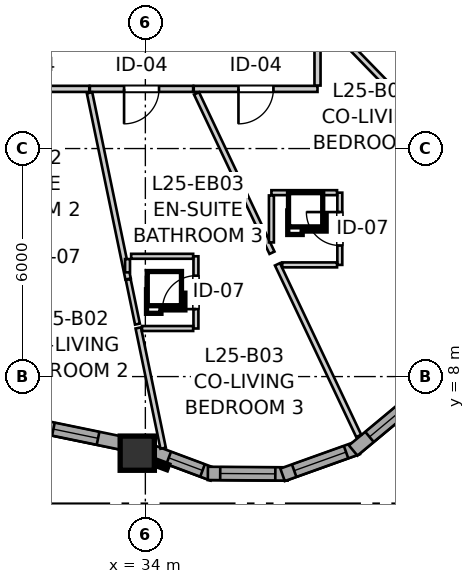
"""IFC4 building model, lengths in metres.
Left out: names, types, materials, properties, quantities, classifications, styles, units other than length and angle.
Written with IfcOpenShell. Run it as: python <this file> out.ifc"""

import sys

from ifc_helpers import new_model, si_unit, direction, frame, frame_2d, origin, origin_2d, place, context, subcontext, project, spatial, rectangle, extrude, source, transform, mapped, element, fill, save


model = new_model("IFC4")
c1 = context("Model", 3, precision=1e-05, world=origin(), true_north=direction((0.0, 1.0)))
c2 = subcontext(c1, "Body", "Model", "MODEL_VIEW")
j1 = project(units=[si_unit("LENGTHUNIT", "METRE"), si_unit("PLANEANGLEUNIT", "RADIAN")], contexts=[c1])
p1 = place(None, origin())
s1 = spatial("IfcSite", under=j1, at=p1, CompositionType="ELEMENT")
p2 = place(p1, origin())
s2 = spatial("IfcBuilding", under=s1, at=p2, CompositionType="ELEMENT")
p3 = place(p2, frame((0.0, 0.0, 86.4)))
s3 = spatial("IfcBuildingStorey", under=s2, at=p3, CompositionType="ELEMENT", Elevation=86.4)
m1 = source(origin(), c2, "Body", "SweptSolid", [
    extrude(rectangle(XDim=0.9, YDim=0.9, at=origin_2d()), origin(), (0.0, 0.0, 1.0), 2.95),
])
p4 = place(p3, frame((33.787, 5.985, 0.0), z_axis=(0.0, 0.0, 1.0), x_axis=(1.0, 0.0, 0.0)))
e1 = element("IfcColumn", 1, at=p4, inside=s3, PredefinedType="COLUMN", context=c2, shape_type="MappedRepresentation", body=[
    mapped(m1, transform((0.0, 0.0, 0.0), x_axis=(1.0, 0.0, 0.0), y_axis=(0.0, 1.0, 0.0), z_axis=(0.0, 0.0, 1.0), scale=1.0)),
])
p5 = place(p3, frame((30.724, 6.794, 0.0), z_axis=(0.0, 0.0, 1.0), x_axis=(0.979439663571, -0.201737317878, 0.0)))
e2 = element("IfcWall", 2, at=p5, inside=s3, PredefinedType="SOLIDWALL", context=c2, shape_type="SweptSolid", body=[
    extrude(rectangle(XDim=2.938, YDim=0.35, at=frame_2d((1.469, 0.0))), origin(), (0.0, 0.0, 1.0), 2.48),
])
p6 = place(p5, frame((0.874, 0.0, 0.82)))
e3 = element("IfcOpeningElement", 3, at=p6, cuts=e2, PredefinedType="OPENING", context=c2, shape_type="SweptSolid", body=[
    extrude(rectangle(XDim=1.2, YDim=1.45, at=frame_2d((0.6, 0.725))), frame((0.0, 0.185, 0.0), z_axis=(0.0, -1.0, 0.0), x_axis=(1.0, 0.0, 0.0)), (0.0, 0.0, 1.0), 0.37),
])
p7 = place(p3, frame((34.059, 6.07, 0.0), z_axis=(0.0, 0.0, 1.0), x_axis=(0.936803747811, -0.349855310219, 0.0)))
e4 = element("IfcWall", 4, at=p7, inside=s3, PredefinedType="SOLIDWALL", context=c2, shape_type="SweptSolid", body=[
    extrude(rectangle(XDim=1.836, YDim=0.35, at=frame_2d((0.918, 0.0))), origin(), (0.0, 0.0, 1.0), 2.48),
])
p8 = place(p7, frame((0.593, 0.0, 0.82)))
e5 = element("IfcOpeningElement", 5, at=p8, cuts=e4, PredefinedType="OPENING", context=c2, shape_type="SweptSolid", body=[
    extrude(rectangle(XDim=0.95, YDim=1.35, at=frame_2d((0.475, 0.675))), frame((0.0, 0.185, 0.0), z_axis=(0.0, -1.0, 0.0), x_axis=(1.0, 0.0, 0.0)), (0.0, 0.0, 1.0), 0.37),
])
p9 = place(p3, frame((35.646, 5.452, 0.0), z_axis=(0.0, 0.0, 1.0), x_axis=(0.999976451414, -0.006862697526, 0.0)))
e6 = element("IfcWall", 6, at=p9, inside=s3, PredefinedType="SOLIDWALL", context=c2, shape_type="SweptSolid", body=[
    extrude(rectangle(XDim=2.099, YDim=0.35, at=frame_2d((1.049, 0.0))), origin(), (0.0, 0.0, 1.0), 2.48),
])
p10 = place(p9, frame((0.324, 0.0, 0.82)))
e7 = element("IfcOpeningElement", 7, at=p10, cuts=e6, PredefinedType="OPENING", context=c2, shape_type="SweptSolid", body=[
    extrude(rectangle(XDim=1.45, YDim=1.25, at=frame_2d((0.725, 0.625))), frame((0.0, 0.185, 0.0), z_axis=(0.0, -1.0, 0.0), x_axis=(1.0, 0.0, 0.0)), (0.0, 0.0, 1.0), 0.37),
])
p11 = place(p3, frame((37.61, 5.415, 0.0), z_axis=(0.0, 0.0, 1.0), x_axis=(0.941473186867, 0.33708787936, 0.0)))
e8 = element("IfcWall", 8, at=p11, inside=s3, PredefinedType="SOLIDWALL", context=c2, shape_type="SweptSolid", body=[
    extrude(rectangle(XDim=2.099, YDim=0.35, at=frame_2d((1.049, 0.0))), origin(), (0.0, 0.0, 1.0), 2.48),
])
p12 = place(p11, frame((0.324, 0.0, 0.82)))
e9 = element("IfcOpeningElement", 9, at=p12, cuts=e8, PredefinedType="OPENING", context=c2, shape_type="SweptSolid", body=[
    extrude(rectangle(XDim=1.45, YDim=1.25, at=frame_2d((0.725, 0.625))), frame((0.0, 0.185, 0.0), z_axis=(0.0, -1.0, 0.0), x_axis=(1.0, 0.0, 0.0)), (0.0, 0.0, 1.0), 0.37),
])
p13 = place(p3, frame((39.469, 6.055, 0.0), z_axis=(0.0, 0.0, 1.0), x_axis=(0.768497696041, 0.639852554249, 0.0)))
e10 = element("IfcWall", 10, at=p13, inside=s3, PredefinedType="SOLIDWALL", context=c2, shape_type="SweptSolid", body=[
    extrude(rectangle(XDim=2.099, YDim=0.35, at=frame_2d((1.049, 0.0))), origin(), (0.0, 0.0, 1.0), 2.48),
])
p14 = place(p13, frame((0.559, 0.0, 0.82)))
e11 = element("IfcOpeningElement", 11, at=p14, cuts=e10, PredefinedType="OPENING", context=c2, shape_type="SweptSolid", body=[
    extrude(rectangle(XDim=1.25, YDim=1.35, at=frame_2d((0.625, 0.675))), frame((0.0, 0.185, 0.0), z_axis=(0.0, -1.0, 0.0), x_axis=(1.0, 0.0, 0.0)), (0.0, 0.0, 1.0), 0.37),
])
p15 = place(p3, frame((38.53, 15.57, 0.0), z_axis=(0.0, 0.0, 1.0), x_axis=(-1.0, 0.0, 0.0)))
e12 = element("IfcWall", 12, at=p15, inside=s3, PredefinedType="PARTITIONING", context=c2, shape_type="SweptSolid", body=[
    extrude(rectangle(XDim=3.257, YDim=0.16, at=frame_2d((1.628, 0.0))), origin(), (0.0, 0.0, 1.0), 2.95),
])
p16 = place(p15, frame((1.16, 0.0, 0.0)))
e13 = element("IfcOpeningElement", 13, at=p16, cuts=e12, PredefinedType="OPENING", context=c2, shape_type="SweptSolid", body=[
    extrude(rectangle(XDim=0.92, YDim=2.1, at=frame_2d((0.46, 1.05))), frame((0.0, 0.09, 0.0), z_axis=(0.0, -1.0, 0.0), x_axis=(1.0, 0.0, 0.0)), (0.0, 0.0, 1.0), 0.18),
])
p17 = place(p3, frame((32.525, 15.57, 0.0), z_axis=(0.0, 0.0, 1.0), x_axis=(-1.0, 0.0, 0.0)))
e14 = element("IfcWall", 14, at=p17, inside=s3, PredefinedType="PARTITIONING", context=c2, shape_type="SweptSolid", body=[
    extrude(rectangle(XDim=3.072, YDim=0.16, at=frame_2d((1.536, 0.0))), origin(), (0.0, 0.0, 1.0), 2.95),
])
p18 = place(p17, frame((1.098, 0.0, 0.0)))
e15 = element("IfcOpeningElement", 15, at=p18, cuts=e14, PredefinedType="OPENING", context=c2, shape_type="SweptSolid", body=[
    extrude(rectangle(XDim=0.92, YDim=2.1, at=frame_2d((0.46, 1.05))), frame((0.0, 0.09, 0.0), z_axis=(0.0, -1.0, 0.0), x_axis=(1.0, 0.0, 0.0)), (0.0, 0.0, 1.0), 0.18),
])
p19 = place(p3, frame((35.258, 15.57, 0.0), z_axis=(0.0, 0.0, 1.0), x_axis=(-1.0, 0.0, 0.0)))
e16 = element("IfcWall", 16, at=p19, inside=s3, PredefinedType="PARTITIONING", context=c2, shape_type="SweptSolid", body=[
    extrude(rectangle(XDim=2.718, YDim=0.16, at=frame_2d((1.359, 0.0))), origin(), (0.0, 0.0, 1.0), 2.95),
])
p20 = place(p19, frame((0.898, 0.0, 0.0)))
e17 = element("IfcOpeningElement", 17, at=p20, cuts=e16, PredefinedType="OPENING", context=c2, shape_type="SweptSolid", body=[
    extrude(rectangle(XDim=0.92, YDim=2.1, at=frame_2d((0.46, 1.05))), frame((0.0, 0.09, 0.0), z_axis=(0.0, -1.0, 0.0), x_axis=(1.0, 0.0, 0.0)), (0.0, 0.0, 1.0), 0.18),
])
p21 = place(p3, frame((39.117, 10.939, 0.0), z_axis=(0.0, 0.0, 1.0), x_axis=(0.0, 1.0, 0.0)))
e18 = element("IfcWall", 18, at=p21, inside=s3, PredefinedType="PARTITIONING", context=c2, shape_type="SweptSolid", body=[
    extrude(rectangle(XDim=1.9, YDim=0.13, at=frame_2d((0.95, 0.0))), origin(), (0.0, 0.0, 1.0), 2.95),
])
p22 = place(p21, frame((0.51, 0.0, 0.0)))
e19 = element("IfcOpeningElement", 19, at=p22, cuts=e18, PredefinedType="OPENING", context=c2, shape_type="SweptSolid", body=[
    extrude(rectangle(XDim=0.88, YDim=2.05, at=frame_2d((0.44, 1.025))), frame((0.0, 0.075, 0.0), z_axis=(0.0, -1.0, 0.0), x_axis=(1.0, 0.0, 0.0)), (0.0, 0.0, 1.0), 0.15),
])
p23 = place(p3, frame((35.331, 9.265, 0.0), z_axis=(0.0, 0.0, 1.0), x_axis=(0.0, 1.0, 0.0)))
e20 = element("IfcWall", 20, at=p23, inside=s3, PredefinedType="PARTITIONING", context=c2, shape_type="SweptSolid", body=[
    extrude(rectangle(XDim=1.9, YDim=0.13, at=frame_2d((0.95, 0.0))), origin(), (0.0, 0.0, 1.0), 2.95),
])
p24 = place(p23, frame((0.51, 0.0, 0.0)))
e21 = element("IfcOpeningElement", 21, at=p24, cuts=e20, PredefinedType="OPENING", context=c2, shape_type="SweptSolid", body=[
    extrude(rectangle(XDim=0.88, YDim=2.05, at=frame_2d((0.44, 1.025))), frame((0.0, 0.075, 0.0), z_axis=(0.0, -1.0, 0.0), x_axis=(1.0, 0.0, 0.0)), (0.0, 0.0, 1.0), 0.15),
])
p25 = place(p3, frame((38.667, 17.429, 0.0), z_axis=(0.0, 0.0, 1.0), x_axis=(0.696417222112, -0.717637131666, 0.0)))
e22 = element("IfcWall", 22, at=p25, inside=s3, PredefinedType="PARTITIONING", context=c2, shape_type="SweptSolid", body=[
    extrude(rectangle(XDim=6.04, YDim=0.145, at=frame_2d((3.02, 0.0))), origin(), (0.0, 0.0, 1.0), 2.95),
])
p26 = place(p3, frame((32.531, 15.468, 0.0), z_axis=(0.0, 0.0, 1.0), x_axis=(0.202792769077, -0.979221677053, 0.0)))
e23 = element("IfcWall", 23, at=p26, inside=s3, PredefinedType="PARTITIONING", context=c2, shape_type="SweptSolid", body=[
    extrude(rectangle(XDim=5.003, YDim=0.145, at=frame_2d((2.502, 0.0))), origin(), (0.0, 0.0, 1.0), 2.95),
])
p27 = place(p3, frame((37.476, 10.954, 0.0), z_axis=(0.0, 0.0, 1.0), x_axis=(0.428094746621, -0.903733859007, 0.0)))
e24 = element("IfcWall", 24, at=p27, inside=s3, PredefinedType="PARTITIONING", context=c2, shape_type="SweptSolid", body=[
    extrude(rectangle(XDim=4.996, YDim=0.145, at=frame_2d((2.498, 0.0))), origin(), (0.0, 0.0, 1.0), 2.95),
])
p28 = place(p3, frame((35.346, 15.452, 0.0), z_axis=(0.0, 0.0, 1.0), x_axis=(0.428023015228, -0.903767834366, 0.0)))
e25 = element("IfcWall", 25, at=p28, inside=s3, PredefinedType="PARTITIONING", context=c2, shape_type="SweptSolid", body=[
    extrude(rectangle(XDim=4.64, YDim=0.145, at=frame_2d((2.32, 0.0))), origin(), (0.0, 0.0, 1.0), 2.95),
])
p29 = place(p3, frame((33.813, 9.28, 0.0), z_axis=(0.0, 0.0, 1.0), x_axis=(0.202648062782, -0.979251633979, 0.0)))
e26 = element("IfcWall", 26, at=p29, inside=s3, PredefinedType="PARTITIONING", context=c2, shape_type="SweptSolid", body=[
    extrude(rectangle(XDim=3.232, YDim=0.145, at=frame_2d((1.616, 0.0))), origin(), (0.0, 0.0, 1.0), 2.95),
])
p30 = place(p3, frame((38.53, 15.658, 0.0), z_axis=(0.0, 0.0, 1.0), x_axis=(0.0, 1.0, 0.0)))
e27 = element("IfcWall", 27, at=p30, inside=s3, PredefinedType="PARTITIONING", context=c2, shape_type="SweptSolid", body=[
    extrude(rectangle(XDim=1.682, YDim=0.16, at=frame_2d((0.841, 0.0))), origin(), (0.0, 0.0, 1.0), 2.95),
])
p31 = place(p3, frame((33.626, 11.165, 0.0), z_axis=(0.0, 0.0, 1.0), x_axis=(1.0, 0.0, 0.0)))
e28 = element("IfcWall", 28, at=p31, inside=s3, PredefinedType="PARTITIONING", context=c2, shape_type="SweptSolid", body=[
    extrude(rectangle(XDim=1.632, YDim=0.13, at=frame_2d((0.816, 0.0))), origin(), (0.0, 0.0, 1.0), 2.95),
])
p32 = place(p3, frame((37.317, 12.839, 0.0), z_axis=(0.0, 0.0, 1.0), x_axis=(1.0, 0.0, 0.0)))
e29 = element("IfcWall", 29, at=p32, inside=s3, PredefinedType="PARTITIONING", context=c2, shape_type="SweptSolid", body=[
    extrude(rectangle(XDim=1.727, YDim=0.13, at=frame_2d((0.864, 0.0))), origin(), (0.0, 0.0, 1.0), 2.95),
])
p33 = place(p3, frame((37.602, 10.939, 0.0), z_axis=(0.0, 0.0, 1.0), x_axis=(1.0, 0.0, 0.0)))
e30 = element("IfcWall", 30, at=p33, inside=s3, PredefinedType="PARTITIONING", context=c2, shape_type="SweptSolid", body=[
    extrude(rectangle(XDim=1.442, YDim=0.13, at=frame_2d((0.721, 0.0))), origin(), (0.0, 0.0, 1.0), 2.95),
])
p34 = place(p3, frame((37.317, 11.53, 0.0), z_axis=(0.0, 0.0, 1.0), x_axis=(0.0, 1.0, 0.0)))
e31 = element("IfcWall", 31, at=p34, inside=s3, PredefinedType="PARTITIONING", context=c2, shape_type="SweptSolid", body=[
    extrude(rectangle(XDim=1.236, YDim=0.13, at=frame_2d((0.618, 0.0))), origin(), (0.0, 0.0, 1.0), 2.95),
])
p35 = place(p3, frame((33.912, 9.265, 0.0), z_axis=(0.0, 0.0, 1.0), x_axis=(1.0, 0.0, 0.0)))
e32 = element("IfcWall", 32, at=p35, inside=s3, PredefinedType="PARTITIONING", context=c2, shape_type="SweptSolid", body=[
    extrude(rectangle(XDim=1.346, YDim=0.13, at=frame_2d((0.673, 0.0))), origin(), (0.0, 0.0, 1.0), 2.95),
])
p36 = place(p3, frame((33.549, 10.553, 0.0), z_axis=(0.0, 0.0, 1.0), x_axis=(0.202855035592, -0.97920877985, 0.0)))
e33 = element("IfcWall", 33, at=p36, inside=s3, PredefinedType="PARTITIONING", context=c2, shape_type="SweptSolid", body=[
    extrude(rectangle(XDim=1.198, YDim=0.13, at=frame_2d((0.599, 0.0))), origin(), (0.0, 0.0, 1.0), 2.95),
])
p37 = place(p3, frame((33.531, 10.742, 0.0), z_axis=(0.0, 0.0, 1.0), x_axis=(0.0, 1.0, 0.0)))
e34 = element("IfcWall", 34, at=p37, inside=s3, PredefinedType="PARTITIONING", context=c2, shape_type="SweptSolid", body=[
    extrude(rectangle(XDim=0.35, YDim=0.13, at=frame_2d((0.175, 0.0))), origin(), (0.0, 0.0, 1.0), 2.95),
])
m2 = source(origin(), c2, "Body", "SweptSolid", [
    extrude(rectangle(XDim=1.2, YDim=1.45, at=frame_2d((0.6, 0.725))), frame((0.0, 0.03, 0.0), z_axis=(0.0, -1.0, 0.0), x_axis=(1.0, 0.0, 0.0)), (0.0, 0.0, 1.0), 0.06),
])
p38 = place(p6, origin())
e35 = element("IfcWindow", 35, at=p38, inside=s3, PartitioningType="SINGLE_PANEL", PredefinedType="WINDOW", context=c2, shape_type="MappedRepresentation", body=[
    mapped(m2, transform((0.0, 0.0, 0.0), x_axis=(1.0, 0.0, 0.0), y_axis=(0.0, 1.0, 0.0), z_axis=(0.0, 0.0, 1.0), scale=1.0)),
])
fill(e3, e35)
m3 = source(origin(), c2, "Body", "SweptSolid", [
    extrude(rectangle(XDim=0.95, YDim=1.35, at=frame_2d((0.475, 0.675))), frame((0.0, 0.03, 0.0), z_axis=(0.0, -1.0, 0.0), x_axis=(1.0, 0.0, 0.0)), (0.0, 0.0, 1.0), 0.06),
])
p39 = place(p8, origin())
e36 = element("IfcWindow", 36, at=p39, inside=s3, PartitioningType="SINGLE_PANEL", PredefinedType="WINDOW", context=c2, shape_type="MappedRepresentation", body=[
    mapped(m3, transform((0.0, 0.0, 0.0), x_axis=(1.0, 0.0, 0.0), y_axis=(0.0, 1.0, 0.0), z_axis=(0.0, 0.0, 1.0), scale=1.0)),
])
fill(e5, e36)
m4 = source(origin(), c2, "Body", "SweptSolid", [
    extrude(rectangle(XDim=1.45, YDim=1.25, at=frame_2d((0.725, 0.625))), frame((0.0, 0.03, 0.0), z_axis=(0.0, -1.0, 0.0), x_axis=(1.0, 0.0, 0.0)), (0.0, 0.0, 1.0), 0.06),
])
p40 = place(p10, origin())
e37 = element("IfcWindow", 37, at=p40, inside=s3, PartitioningType="SINGLE_PANEL", PredefinedType="WINDOW", context=c2, shape_type="MappedRepresentation", body=[
    mapped(m4, transform((0.0, 0.0, 0.0), x_axis=(1.0, 0.0, 0.0), y_axis=(0.0, 1.0, 0.0), z_axis=(0.0, 0.0, 1.0), scale=1.0)),
])
fill(e7, e37)
p41 = place(p12, origin())
e38 = element("IfcWindow", 38, at=p41, inside=s3, PartitioningType="SINGLE_PANEL", PredefinedType="WINDOW", context=c2, shape_type="MappedRepresentation", body=[
    mapped(m4, transform((0.0, 0.0, 0.0), x_axis=(1.0, 0.0, 0.0), y_axis=(0.0, 1.0, 0.0), z_axis=(0.0, 0.0, 1.0), scale=1.0)),
])
fill(e9, e38)
m5 = source(origin(), c2, "Body", "SweptSolid", [
    extrude(rectangle(XDim=1.25, YDim=1.35, at=frame_2d((0.625, 0.675))), frame((0.0, 0.03, 0.0), z_axis=(0.0, -1.0, 0.0), x_axis=(1.0, 0.0, 0.0)), (0.0, 0.0, 1.0), 0.06),
])
p42 = place(p14, origin())
e39 = element("IfcWindow", 39, at=p42, inside=s3, PartitioningType="SINGLE_PANEL", PredefinedType="WINDOW", context=c2, shape_type="MappedRepresentation", body=[
    mapped(m5, transform((0.0, 0.0, 0.0), x_axis=(1.0, 0.0, 0.0), y_axis=(0.0, 1.0, 0.0), z_axis=(0.0, 0.0, 1.0), scale=1.0)),
])
fill(e11, e39)
m6 = source(origin(), c2, "Body", "SweptSolid", [
    extrude(rectangle(XDim=0.92, YDim=2.1, at=frame_2d((0.46, 1.05))), frame((0.0, 0.025, 0.0), z_axis=(0.0, -1.0, 0.0), x_axis=(1.0, 0.0, 0.0)), (0.0, 0.0, 1.0), 0.05),
])
p43 = place(p16, origin())
e40 = element("IfcDoor", 40, at=p43, inside=s3, OperationType="SINGLE_SWING_RIGHT", PredefinedType="DOOR", context=c2, shape_type="MappedRepresentation", body=[
    mapped(m6, transform((0.0, 0.0, 0.0), x_axis=(1.0, 0.0, 0.0), y_axis=(0.0, 1.0, 0.0), z_axis=(0.0, 0.0, 1.0), scale=1.0)),
])
fill(e13, e40)
p44 = place(p20, origin())
e41 = element("IfcDoor", 41, at=p44, inside=s3, OperationType="SINGLE_SWING_RIGHT", PredefinedType="DOOR", context=c2, shape_type="MappedRepresentation", body=[
    mapped(m6, transform((0.0, 0.0, 0.0), x_axis=(1.0, 0.0, 0.0), y_axis=(0.0, 1.0, 0.0), z_axis=(0.0, 0.0, 1.0), scale=1.0)),
])
fill(e17, e41)
m7 = source(origin(), c2, "Body", "SweptSolid", [
    extrude(rectangle(XDim=0.88, YDim=2.05, at=frame_2d((0.44, 1.025))), frame((0.0, 0.025, 0.0), z_axis=(0.0, -1.0, 0.0), x_axis=(1.0, 0.0, 0.0)), (0.0, 0.0, 1.0), 0.05),
])
p45 = place(p22, origin())
e42 = element("IfcDoor", 42, at=p45, inside=s3, OperationType="SINGLE_SWING_RIGHT", PredefinedType="DOOR", context=c2, shape_type="MappedRepresentation", body=[
    mapped(m7, transform((0.0, 0.0, 0.0), x_axis=(1.0, 0.0, 0.0), y_axis=(0.0, 1.0, 0.0), z_axis=(0.0, 0.0, 1.0), scale=1.0)),
])
fill(e19, e42)
p46 = place(p24, origin())
e43 = element("IfcDoor", 43, at=p46, inside=s3, OperationType="SINGLE_SWING_LEFT", PredefinedType="DOOR", context=c2, shape_type="MappedRepresentation", body=[
    mapped(m7, transform((0.0, 0.0, 0.0), x_axis=(1.0, 0.0, 0.0), y_axis=(0.0, 1.0, 0.0), z_axis=(0.0, 0.0, 1.0), scale=1.0)),
])
fill(e21, e43)
save(model, sys.argv[1])
